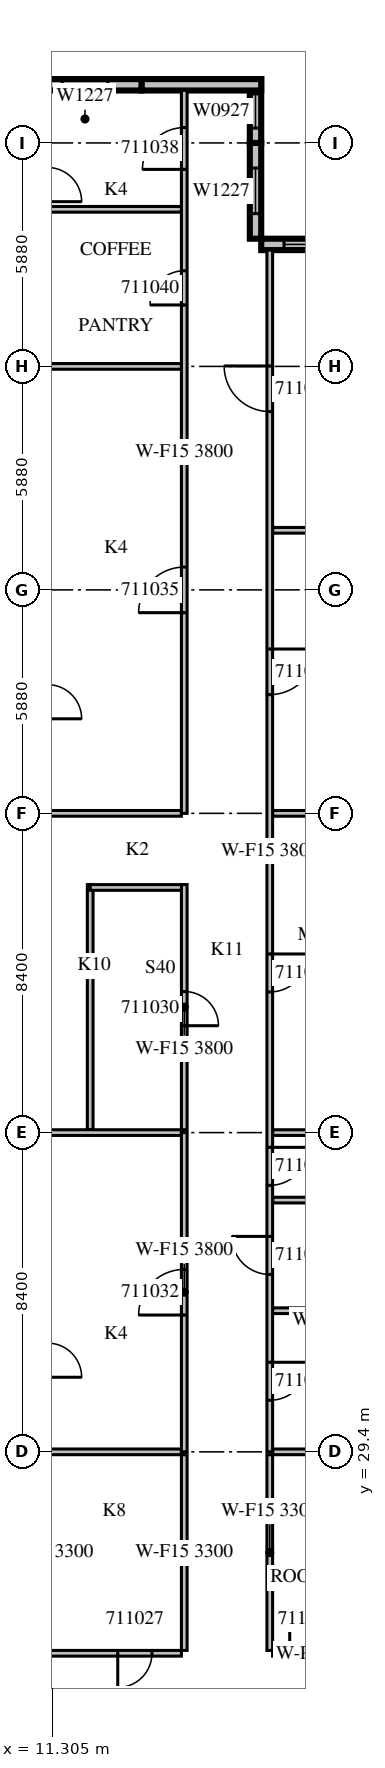
"""IFC4 building model, lengths in metres.
Left out: names, types, materials, properties, quantities, classifications, styles, units other than length and angle.
Written with IfcOpenShell. Run it as: python <this file> out.ifc"""

import sys

from ifc_helpers import new_model, si_unit, direction, frame, frame_2d, origin, place, context, subcontext, project, spatial, rectangle, extrude, source, transform, mapped, element, fill, save


model = new_model("IFC4")
c1 = context("Model", 3, precision=1e-05, world=origin(), true_north=direction((0.0, 1.0)))
c2 = subcontext(c1, "Body", "Model", "MODEL_VIEW")
j1 = project(units=[si_unit("LENGTHUNIT", "METRE"), si_unit("PLANEANGLEUNIT", "RADIAN")], contexts=[c1])
p1 = place(None, origin())
s1 = spatial("IfcSite", under=j1, at=p1, CompositionType="ELEMENT")
p2 = place(p1, origin())
s2 = spatial("IfcBuilding", under=s1, at=p2, CompositionType="ELEMENT")
p3 = place(p2, frame((0.0, 0.0, 57.3)))
s3 = spatial("IfcBuildingStorey", under=s2, at=p3, CompositionType="ELEMENT", Elevation=57.3)
m1 = source(origin(), c2, "Body", "SweptSolid", [
    extrude(rectangle(XDim=4.2, YDim=0.3, at=frame_2d((2.1, 0.0))), origin(), (0.0, 0.0, 1.0), 3.8),
])
p4 = place(p3, frame((21.0, 61.17, 0.0), z_axis=(0.0, 0.0, 1.0), x_axis=(-1.0, 0.0, 0.0)))
e1 = element("IfcWall", 1, at=p4, inside=s3, PredefinedType="STANDARD", context=c2, shape_type="MappedRepresentation", body=[
    mapped(m1, transform((0.0, 0.0, 0.0), scale=1.0)),
])
m2 = source(origin(), c2, "Body", "SweptSolid", [
    extrude(rectangle(XDim=3.0, YDim=2.7, at=frame_2d((1.5, 1.35))), frame((0.0, 0.16, 0.0), z_axis=(0.0, -1.0, 0.0), x_axis=(1.0, 0.0, 0.0)), (0.0, 0.0, 1.0), 0.32),
])
p5 = place(p4, frame((0.6, 0.0, 0.6)))
e2 = element("IfcOpeningElement", 2, at=p5, cuts=e1, PredefinedType="OPENING", context=c2, shape_type="MappedRepresentation", body=[
    mapped(m2, transform((0.0, 0.0, 0.0), scale=1.0)),
])
m3 = source(origin(), c2, "Body", "SweptSolid", [
    extrude(rectangle(XDim=2.52, YDim=0.3, at=frame_2d((1.26, 0.0))), origin(), (0.0, 0.0, 1.0), 3.8),
])
p6 = place(p3, frame((16.65, 61.32, 0.0), z_axis=(0.0, 0.0, 1.0), x_axis=(0.0, 1.0, 0.0)))
e3 = element("IfcWall", 3, at=p6, inside=s3, PredefinedType="STANDARD", context=c2, shape_type="MappedRepresentation", body=[
    mapped(m3, transform((0.0, 0.0, 0.0), scale=1.0)),
])
m4 = source(origin(), c2, "Body", "SweptSolid", [
    extrude(rectangle(XDim=1.2, YDim=2.7, at=frame_2d((0.6, 1.35))), frame((0.0, 0.16, 0.0), z_axis=(0.0, -1.0, 0.0), x_axis=(1.0, 0.0, 0.0)), (0.0, 0.0, 1.0), 0.32),
])
p7 = place(p6, frame((0.66, 0.0, 0.6)))
e4 = element("IfcOpeningElement", 4, at=p7, cuts=e3, PredefinedType="OPENING", context=c2, shape_type="MappedRepresentation", body=[
    mapped(m4, transform((0.0, 0.0, 0.0), scale=1.0)),
])
m5 = source(origin(), c2, "Body", "SweptSolid", [
    extrude(rectangle(XDim=1.68, YDim=0.3, at=frame_2d((0.84, 0.0))), origin(), (0.0, 0.0, 1.0), 3.8),
])
p8 = place(p3, frame((16.65, 63.84, 0.0), z_axis=(0.0, 0.0, 1.0), x_axis=(0.0, 1.0, 0.0)))
e5 = element("IfcWall", 5, at=p8, inside=s3, PredefinedType="STANDARD", context=c2, shape_type="MappedRepresentation", body=[
    mapped(m5, transform((0.0, 0.0, 0.0), scale=1.0)),
])
m6 = source(origin(), c2, "Body", "SweptSolid", [
    extrude(rectangle(XDim=0.9, YDim=2.7, at=frame_2d((0.45, 1.35))), frame((0.0, 0.16, 0.0), z_axis=(0.0, -1.0, 0.0), x_axis=(1.0, 0.0, 0.0)), (0.0, 0.0, 1.0), 0.32),
])
p9 = place(p8, frame((0.39, 0.0, 0.6)))
e6 = element("IfcOpeningElement", 6, at=p9, cuts=e5, PredefinedType="OPENING", context=c2, shape_type="MappedRepresentation", body=[
    mapped(m6, transform((0.0, 0.0, 0.0), scale=1.0)),
])
m7 = source(origin(), c2, "Body", "SweptSolid", [
    extrude(rectangle(XDim=3.15, YDim=0.3, at=frame_2d((1.575, 0.0))), origin(), (0.0, 0.0, 1.0), 3.8),
])
p10 = place(p3, frame((16.8, 65.37, 0.0), z_axis=(0.0, 0.0, 1.0), x_axis=(-1.0, 0.0, 0.0)))
e7 = element("IfcWall", 7, at=p10, inside=s3, PredefinedType="STANDARD", context=c2, shape_type="MappedRepresentation", body=[
    mapped(m7, transform((0.0, 0.0, 0.0), scale=1.0)),
])
p11 = place(p3, frame((13.65, 65.37, 0.0), z_axis=(0.0, 0.0, 1.0), x_axis=(-1.0, 0.0, 0.0)))
e8 = element("IfcWall", 8, at=p11, inside=s3, PredefinedType="STANDARD", context=c2, shape_type="MappedRepresentation", body=[
    mapped(m7, transform((0.0, 0.0, 0.0), scale=1.0)),
])
p12 = place(p11, frame((0.887, 0.0, 0.6)))
e9 = element("IfcOpeningElement", 9, at=p12, cuts=e8, PredefinedType="OPENING", context=c2, shape_type="MappedRepresentation", body=[
    mapped(m4, transform((0.0, 0.0, 0.0), scale=1.0)),
])
p13 = place(p3, frame((3.075, 24.1, 0.0), z_axis=(0.0, 0.0, 1.0), x_axis=(1.0, 0.0, 0.0)))
e10 = element("IfcWall", 10, at=p13, inside=s3, PredefinedType="PARTITIONING", context=c2, shape_type="SweptSolid", body=[
    extrude(rectangle(XDim=11.625, YDim=0.15, at=frame_2d((5.812, 0.0))), origin(), (0.0, 0.0, 1.0), 2.8),
])
m8 = source(origin(), c2, "Body", "SweptSolid", [
    extrude(rectangle(XDim=0.9, YDim=2.1, at=frame_2d((0.45, 1.05))), frame((0.0, 0.085, 0.0), z_axis=(0.0, -1.0, 0.0), x_axis=(1.0, 0.0, 0.0)), (0.0, 0.0, 1.0), 0.17),
])
p14 = place(p13, frame((3.263, 0.0, 0.0)))
e11 = element("IfcOpeningElement", 11, at=p14, cuts=e10, PredefinedType="OPENING", context=c2, shape_type="MappedRepresentation", body=[
    mapped(m8, transform((0.0, 0.0, 0.0), scale=1.0)),
])
p15 = place(p13, frame((9.95, 0.0, 0.0)))
e12 = element("IfcOpeningElement", 12, at=p15, cuts=e10, PredefinedType="OPENING", context=c2, shape_type="MappedRepresentation", body=[
    mapped(m8, transform((0.0, 0.0, 0.0), scale=1.0)),
])
m9 = source(origin(), c2, "Body", "SweptSolid", [
    extrude(rectangle(XDim=3.6, YDim=0.15, at=frame_2d((1.8, 0.0))), origin(), (0.0, 0.0, 1.0), 2.8),
])
p16 = place(p3, frame((17.1, 24.1, 0.0), z_axis=(0.0, 0.0, 1.0), x_axis=(1.0, 0.0, 0.0)))
e13 = element("IfcWall", 13, at=p16, inside=s3, PredefinedType="PARTITIONING", context=c2, shape_type="MappedRepresentation", body=[
    mapped(m9, transform((0.0, 0.0, 0.0), scale=1.0)),
])
p17 = place(p16, frame((0.45, 0.0, 0.0)))
e14 = element("IfcOpeningElement", 14, at=p17, cuts=e13, PredefinedType="OPENING", context=c2, shape_type="MappedRepresentation", body=[
    mapped(m8, transform((0.0, 0.0, 0.0), scale=1.0)),
])
m10 = source(origin(), c2, "Body", "SweptSolid", [
    extrude(rectangle(XDim=5.15, YDim=0.15, at=frame_2d((2.575, 0.0))), origin(), (0.0, 0.0, 1.0), 3.3),
])
for number, where, z_axis, x_axis in (
    (15, (14.775, 24.175, 0.0), (0.0, 0.0, 1.0), (0.0, 1.0, 0.0)),
    (16, (17.025, 29.325, 0.0), (0.0, 0.0, 1.0), (0.0, -1.0, 0.0)),
):
    element("IfcWall", number, at=place(p3, frame(where, z_axis=z_axis, x_axis=x_axis)), inside=s3, PredefinedType="PARTITIONING", context=c2, shape_type="MappedRepresentation", body=[
        mapped(m10, transform((0.0, 0.0, 0.0), scale=1.0)),
    ])
m11 = source(origin(), c2, "Body", "SweptSolid", [
    extrude(rectangle(XDim=3.601, YDim=0.15, at=frame_2d((1.8, 0.0))), origin(), (0.0, 0.0, 1.0), 3.8),
])
p18 = place(p3, frame((14.7, 29.4, 0.0), z_axis=(0.0, 0.0, 1.0), x_axis=(-1.0, 0.0, 0.0)))
e17 = element("IfcWall", 17, at=p18, inside=s3, PredefinedType="PARTITIONING", context=c2, shape_type="MappedRepresentation", body=[
    mapped(m11, transform((0.0, 0.0, 0.0), scale=1.0)),
])
m12 = source(origin(), c2, "Body", "SweptSolid", [
    extrude(rectangle(XDim=2.701, YDim=0.15, at=frame_2d((1.351, 0.0))), origin(), (0.0, 0.0, 1.0), 3.8),
])
p19 = place(p3, frame((19.801, 29.4, 0.0), z_axis=(0.0, 0.0, 1.0), x_axis=(-1.0, 0.0, 0.0)))
e18 = element("IfcWall", 18, at=p19, inside=s3, PredefinedType="PARTITIONING", context=c2, shape_type="MappedRepresentation", body=[
    mapped(m12, transform((0.0, 0.0, 0.0), scale=1.0)),
])
m13 = source(origin(), c2, "Body", "SweptSolid", [
    extrude(rectangle(XDim=6.45, YDim=0.15, at=frame_2d((3.225, 0.0))), origin(), (0.0, 0.0, 1.0), 3.8),
])
p20 = place(p3, frame((12.3, 44.325, 0.0), z_axis=(0.0, 0.0, 1.0), x_axis=(0.0, -1.0, 0.0)))
e19 = element("IfcWall", 19, at=p20, inside=s3, PredefinedType="PARTITIONING", context=c2, shape_type="MappedRepresentation", body=[
    mapped(m13, transform((0.0, 0.0, 0.0), scale=1.0)),
])
p21 = place(p3, frame((14.775, 44.25, 0.0), z_axis=(0.0, 0.0, 1.0), x_axis=(-1.0, 0.0, 0.0)))
e20 = element("IfcWall", 20, at=p21, inside=s3, PredefinedType="PARTITIONING", context=c2, shape_type="SweptSolid", body=[
    extrude(rectangle(XDim=2.475, YDim=0.15, at=frame_2d((1.238, 0.0))), origin(), (0.0, 0.0, 1.0), 3.8),
])
p22 = place(p3, frame((14.775, 37.875, 0.0), z_axis=(0.0, 0.0, 1.0), x_axis=(0.0, 1.0, 0.0)))
e21 = element("IfcWall", 21, at=p22, inside=s3, PredefinedType="PARTITIONING", context=c2, shape_type="MappedRepresentation", body=[
    mapped(m13, transform((0.0, 0.0, 0.0), scale=1.0)),
])
p23 = place(p22, frame((2.737, 0.0, 0.0)))
e22 = element("IfcOpeningElement", 22, at=p23, cuts=e21, PredefinedType="OPENING", context=c2, shape_type="MappedRepresentation", body=[
    mapped(m8, transform((0.0, 0.0, 0.0), scale=1.0)),
])
m14 = source(origin(), c2, "Body", "SweptSolid", [
    extrude(rectangle(XDim=3.45, YDim=0.15, at=frame_2d((1.725, 0.0))), origin(), (0.0, 0.0, 1.0), 3.8),
])
for number, where, z_axis, x_axis in (
    (23, (14.7, 37.8, 0.0), (0.0, 0.0, 1.0), (-1.0, 0.0, 0.0)),
    (24, (14.7, 62.093, 0.0), (0.0, 0.0, 1.0), (-1.0, 0.0, 0.0)),
    (25, (14.7, 46.2, 0.0), (0.0, 0.0, 1.0), (-1.0, 0.0, 0.0)),
    (26, (14.7, 57.96, 0.0), (0.0, 0.0, 1.0), (-1.0, 0.0, 0.0)),
):
    element("IfcWall", number, at=place(p3, frame(where, z_axis=z_axis, x_axis=x_axis)), inside=s3, PredefinedType="PARTITIONING", context=c2, shape_type="MappedRepresentation", body=[
        mapped(m14, transform((0.0, 0.0, 0.0), scale=1.0)),
    ])
m15 = source(origin(), c2, "Body", "SweptSolid", [
    extrude(rectangle(XDim=3.6, YDim=0.15, at=frame_2d((1.8, 0.0))), origin(), (0.0, 0.0, 1.0), 3.8),
])
for number, where, z_axis, x_axis in (
    (27, (17.1, 33.113, 0.0), (0.0, 0.0, 1.0), (1.0, 0.0, 0.0)),
    (28, (17.1, 36.024, 0.0), (0.0, 0.0, 1.0), (1.0, 0.0, 0.0)),
    (29, (17.1, 53.648, 0.0), (0.0, 0.0, 1.0), (1.0, 0.0, 0.0)),
):
    element("IfcWall", number, at=place(p3, frame(where, z_axis=z_axis, x_axis=x_axis)), inside=s3, PredefinedType="PARTITIONING", context=c2, shape_type="MappedRepresentation", body=[
        mapped(m15, transform((0.0, 0.0, 0.0), scale=1.0)),
    ])
for number, where, z_axis, x_axis in (
    (30, (19.801, 37.8, 0.0), (0.0, 0.0, 1.0), (-1.0, 0.0, 0.0)),
    (31, (19.801, 46.2, 0.0), (0.0, 0.0, 1.0), (-1.0, 0.0, 0.0)),
):
    element("IfcWall", number, at=place(p3, frame(where, z_axis=z_axis, x_axis=x_axis)), inside=s3, PredefinedType="PARTITIONING", context=c2, shape_type="MappedRepresentation", body=[
        mapped(m12, transform((0.0, 0.0, 0.0), scale=1.0)),
    ])
m16 = source(origin(), c2, "Body", "SweptSolid", [
    extrude(rectangle(XDim=8.4, YDim=0.15, at=frame_2d((4.2, 0.0))), origin(), (0.0, 0.0, 1.0), 3.8),
])
p24 = place(p3, frame((14.775, 29.4, 0.0), z_axis=(0.0, 0.0, 1.0), x_axis=(0.0, 1.0, 0.0)))
e32 = element("IfcWall", 32, at=p24, inside=s3, PredefinedType="PARTITIONING", context=c2, shape_type="MappedRepresentation", body=[
    mapped(m16, transform((0.0, 0.0, 0.0), scale=1.0)),
])
m17 = source(origin(), c2, "Body", "SweptSolid", [
    extrude(rectangle(XDim=1.2, YDim=2.1, at=frame_2d((0.6, 1.05))), frame((0.0, 0.085, 0.0), z_axis=(0.0, -1.0, 0.0), x_axis=(1.0, 0.0, 0.0)), (0.0, 0.0, 1.0), 0.17),
])
p25 = place(p24, frame((3.6, 0.0, 0.0)))
e33 = element("IfcOpeningElement", 33, at=p25, cuts=e32, PredefinedType="OPENING", context=c2, shape_type="MappedRepresentation", body=[
    mapped(m17, transform((0.0, 0.0, 0.0), scale=1.0)),
])
m18 = source(origin(), c2, "Body", "SweptSolid", [
    extrude(rectangle(XDim=19.02, YDim=0.15, at=frame_2d((9.51, 0.0))), origin(), (0.0, 0.0, 1.0), 3.8),
])
p26 = place(p3, frame((14.775, 46.2, 0.0), z_axis=(0.0, 0.0, 1.0), x_axis=(0.0, 1.0, 0.0)))
e34 = element("IfcWall", 34, at=p26, inside=s3, PredefinedType="PARTITIONING", context=c2, shape_type="MappedRepresentation", body=[
    mapped(m18, transform((0.0, 0.0, 0.0), scale=1.0)),
])
p27 = place(p26, frame((5.28, 0.0, 0.0)))
e35 = element("IfcOpeningElement", 35, at=p27, cuts=e34, PredefinedType="OPENING", context=c2, shape_type="MappedRepresentation", body=[
    mapped(m17, transform((0.0, 0.0, 0.0), scale=1.0)),
])
m19 = source(origin(), c2, "Body", "SweptSolid", [
    extrude(rectangle(XDim=1.1, YDim=2.1, at=frame_2d((0.55, 1.05))), frame((0.0, 0.085, 0.0), z_axis=(0.0, -1.0, 0.0), x_axis=(1.0, 0.0, 0.0)), (0.0, 0.0, 1.0), 0.17),
])
p28 = place(p26, frame((16.944, 0.0, 0.0)))
e36 = element("IfcOpeningElement", 36, at=p28, cuts=e34, PredefinedType="OPENING", context=c2, shape_type="MappedRepresentation", body=[
    mapped(m19, transform((0.0, 0.0, 0.0), scale=1.0)),
])
p29 = place(p26, frame((13.377, 0.0, 0.0)))
e37 = element("IfcOpeningElement", 37, at=p29, cuts=e34, PredefinedType="OPENING", context=c2, shape_type="MappedRepresentation", body=[
    mapped(m8, transform((0.0, 0.0, 0.0), scale=1.0)),
])
m20 = source(origin(), c2, "Body", "SweptSolid", [
    extrude(rectangle(XDim=31.62, YDim=0.15, at=frame_2d((15.81, 0.0))), origin(), (0.0, 0.0, 1.0), 3.8),
])
p30 = place(p3, frame((17.025, 61.02, 0.0), z_axis=(0.0, 0.0, 1.0), x_axis=(0.0, -1.0, 0.0)))
e38 = element("IfcWall", 38, at=p30, inside=s3, PredefinedType="PARTITIONING", context=c2, shape_type="MappedRepresentation", body=[
    mapped(m20, transform((0.0, 0.0, 0.0), scale=1.0)),
])
m21 = source(origin(), c2, "Body", "SweptSolid", [
    extrude(rectangle(XDim=1.0, YDim=2.1, at=frame_2d((0.5, 1.05))), frame((0.0, 0.085, 0.0), z_axis=(0.0, -1.0, 0.0), x_axis=(1.0, 0.0, 0.0)), (0.0, 0.0, 1.0), 0.17),
])
p31 = place(p30, frame((29.263, 0.0, 0.0)))
e39 = element("IfcOpeningElement", 39, at=p31, cuts=e38, PredefinedType="OPENING", context=c2, shape_type="MappedRepresentation", body=[
    mapped(m21, transform((0.0, 0.0, 0.0), scale=1.0)),
])
p32 = place(p30, frame((25.951, 0.0, 0.0)))
e40 = element("IfcOpeningElement", 40, at=p32, cuts=e38, PredefinedType="OPENING", context=c2, shape_type="MappedRepresentation", body=[
    mapped(m21, transform((0.0, 0.0, 0.0), scale=1.0)),
])
p33 = place(p30, frame((23.608, 0.0, 0.0)))
e41 = element("IfcOpeningElement", 41, at=p33, cuts=e38, PredefinedType="OPENING", context=c2, shape_type="MappedRepresentation", body=[
    mapped(m21, transform((0.0, 0.0, 0.0), scale=1.0)),
])
p34 = place(p30, frame((18.52, 0.0, 0.0)))
e42 = element("IfcOpeningElement", 42, at=p34, cuts=e38, PredefinedType="OPENING", context=c2, shape_type="MappedRepresentation", body=[
    mapped(m21, transform((0.0, 0.0, 0.0), scale=1.0)),
])
p35 = place(p30, frame((10.496, 0.0, 0.0)))
e43 = element("IfcOpeningElement", 43, at=p35, cuts=e38, PredefinedType="OPENING", context=c2, shape_type="MappedRepresentation", body=[
    mapped(m17, transform((0.0, 0.0, 0.0), scale=1.0)),
])
p36 = place(p30, frame((3.049, 0.0, 0.0)))
e44 = element("IfcOpeningElement", 44, at=p36, cuts=e38, PredefinedType="OPENING", context=c2, shape_type="MappedRepresentation", body=[
    mapped(m17, transform((0.0, 0.0, 0.0), scale=1.0)),
])
m22 = source(origin(), c2, "Body", "SweptSolid", [
    extrude(rectangle(XDim=3.0, YDim=2.7, at=frame_2d((1.5, 1.35))), frame((0.0, 0.03, 0.0), z_axis=(0.0, -1.0, 0.0), x_axis=(1.0, 0.0, 0.0)), (0.0, 0.0, 1.0), 0.06),
])
p37 = place(p5, origin())
e45 = element("IfcWindow", 45, at=p37, inside=s3, PartitioningType="SINGLE_PANEL", PredefinedType="WINDOW", context=c2, shape_type="MappedRepresentation", body=[
    mapped(m22, transform((0.0, 0.0, 0.0), scale=1.0)),
])
fill(e2, e45)
m23 = source(origin(), c2, "Body", "SweptSolid", [
    extrude(rectangle(XDim=1.2, YDim=2.7, at=frame_2d((0.6, 1.35))), frame((0.0, 0.03, 0.0), z_axis=(0.0, -1.0, 0.0), x_axis=(1.0, 0.0, 0.0)), (0.0, 0.0, 1.0), 0.06),
])
p38 = place(p7, origin())
e46 = element("IfcWindow", 46, at=p38, inside=s3, PartitioningType="SINGLE_PANEL", PredefinedType="WINDOW", context=c2, shape_type="MappedRepresentation", body=[
    mapped(m23, transform((0.0, 0.0, 0.0), scale=1.0)),
])
fill(e4, e46)
m24 = source(origin(), c2, "Body", "SweptSolid", [
    extrude(rectangle(XDim=0.9, YDim=2.7, at=frame_2d((0.45, 1.35))), frame((0.0, 0.03, 0.0), z_axis=(0.0, -1.0, 0.0), x_axis=(1.0, 0.0, 0.0)), (0.0, 0.0, 1.0), 0.06),
])
p39 = place(p9, origin())
e47 = element("IfcWindow", 47, at=p39, inside=s3, PartitioningType="SINGLE_PANEL", PredefinedType="WINDOW", context=c2, shape_type="MappedRepresentation", body=[
    mapped(m24, transform((0.0, 0.0, 0.0), scale=1.0)),
])
fill(e6, e47)
p40 = place(p12, origin())
e48 = element("IfcWindow", 48, at=p40, inside=s3, PartitioningType="SINGLE_PANEL", PredefinedType="WINDOW", context=c2, shape_type="MappedRepresentation", body=[
    mapped(m23, transform((0.0, 0.0, 0.0), scale=1.0)),
])
fill(e9, e48)
m25 = source(origin(), c2, "Body", "SweptSolid", [
    extrude(rectangle(XDim=0.9, YDim=2.1, at=frame_2d((0.45, 1.05))), frame((0.0, 0.025, 0.0), z_axis=(0.0, -1.0, 0.0), x_axis=(1.0, 0.0, 0.0)), (0.0, 0.0, 1.0), 0.05),
])
p41 = place(p15, origin())
e49 = element("IfcDoor", 49, at=p41, inside=s3, OperationType="SINGLE_SWING_RIGHT", PredefinedType="DOOR", context=c2, shape_type="MappedRepresentation", body=[
    mapped(m25, transform((0.0, 0.0, 0.0), scale=1.0)),
])
fill(e12, e49)
p42 = place(p17, origin())
e50 = element("IfcDoor", 50, at=p42, inside=s3, OperationType="SINGLE_SWING_LEFT", PredefinedType="DOOR", context=c2, shape_type="MappedRepresentation", body=[
    mapped(m25, transform((0.0, 0.0, 0.0), scale=1.0)),
])
fill(e14, e50)
p43 = place(p23, origin())
e51 = element("IfcDoor", 51, at=p43, inside=s3, OperationType="SINGLE_SWING_RIGHT", PredefinedType="DOOR", context=c2, shape_type="MappedRepresentation", body=[
    mapped(m25, transform((0.0, 0.0, 0.0), scale=1.0)),
])
fill(e22, e51)
m26 = source(origin(), c2, "Body", "SweptSolid", [
    extrude(rectangle(XDim=1.2, YDim=2.1, at=frame_2d((0.6, 1.05))), frame((0.0, 0.025, 0.0), z_axis=(0.0, -1.0, 0.0), x_axis=(1.0, 0.0, 0.0)), (0.0, 0.0, 1.0), 0.05),
])
p44 = place(p25, origin())
e52 = element("IfcDoor", 52, at=p44, inside=s3, OperationType="SINGLE_SWING_LEFT", PredefinedType="DOOR", context=c2, shape_type="MappedRepresentation", body=[
    mapped(m26, transform((0.0, 0.0, 0.0), scale=1.0)),
])
fill(e33, e52)
p45 = place(p27, origin())
e53 = element("IfcDoor", 53, at=p45, inside=s3, OperationType="SINGLE_SWING_LEFT", PredefinedType="DOOR", context=c2, shape_type="MappedRepresentation", body=[
    mapped(m26, transform((0.0, 0.0, 0.0), scale=1.0)),
])
fill(e35, e53)
m27 = source(origin(), c2, "Body", "SweptSolid", [
    extrude(rectangle(XDim=1.1, YDim=2.1, at=frame_2d((0.55, 1.05))), frame((0.0, 0.025, 0.0), z_axis=(0.0, -1.0, 0.0), x_axis=(1.0, 0.0, 0.0)), (0.0, 0.0, 1.0), 0.05),
])
p46 = place(p28, origin())
e54 = element("IfcDoor", 54, at=p46, inside=s3, OperationType="SINGLE_SWING_LEFT", PredefinedType="DOOR", context=c2, shape_type="MappedRepresentation", body=[
    mapped(m27, transform((0.0, 0.0, 0.0), scale=1.0)),
])
fill(e36, e54)
p47 = place(p29, origin())
e55 = element("IfcDoor", 55, at=p47, inside=s3, OperationType="SINGLE_SWING_LEFT", PredefinedType="DOOR", context=c2, shape_type="MappedRepresentation", body=[
    mapped(m25, transform((0.0, 0.0, 0.0), scale=1.0)),
])
fill(e37, e55)
m28 = source(origin(), c2, "Body", "SweptSolid", [
    extrude(rectangle(XDim=1.0, YDim=2.1, at=frame_2d((0.5, 1.05))), frame((0.0, 0.025, 0.0), z_axis=(0.0, -1.0, 0.0), x_axis=(1.0, 0.0, 0.0)), (0.0, 0.0, 1.0), 0.05),
])
p48 = place(p31, origin())
e56 = element("IfcDoor", 56, at=p48, inside=s3, OperationType="SINGLE_SWING_LEFT", PredefinedType="DOOR", context=c2, shape_type="MappedRepresentation", body=[
    mapped(m28, transform((0.0, 0.0, 0.0), scale=1.0)),
])
fill(e39, e56)
p49 = place(p32, origin())
e57 = element("IfcDoor", 57, at=p49, inside=s3, OperationType="SINGLE_SWING_RIGHT", PredefinedType="DOOR", context=c2, shape_type="MappedRepresentation", body=[
    mapped(m28, transform((0.0, 0.0, 0.0), scale=1.0)),
])
fill(e40, e57)
p50 = place(p33, origin())
e58 = element("IfcDoor", 58, at=p50, inside=s3, OperationType="SINGLE_SWING_LEFT", PredefinedType="DOOR", context=c2, shape_type="MappedRepresentation", body=[
    mapped(m28, transform((0.0, 0.0, 0.0), scale=1.0)),
])
fill(e41, e58)
p51 = place(p34, origin())
e59 = element("IfcDoor", 59, at=p51, inside=s3, OperationType="SINGLE_SWING_LEFT", PredefinedType="DOOR", context=c2, shape_type="MappedRepresentation", body=[
    mapped(m28, transform((0.0, 0.0, 0.0), scale=1.0)),
])
fill(e42, e59)
p52 = place(p35, origin())
e60 = element("IfcDoor", 60, at=p52, inside=s3, OperationType="SINGLE_SWING_LEFT", PredefinedType="DOOR", context=c2, shape_type="MappedRepresentation", body=[
    mapped(m26, transform((0.0, 0.0, 0.0), scale=1.0)),
])
fill(e43, e60)
p53 = place(p36, origin())
e61 = element("IfcDoor", 61, at=p53, inside=s3, OperationType="SINGLE_SWING_RIGHT", PredefinedType="DOOR", context=c2, shape_type="MappedRepresentation", body=[
    mapped(m26, transform((0.0, 0.0, 0.0), scale=1.0)),
])
fill(e44, e61)
save(model, sys.argv[1])
